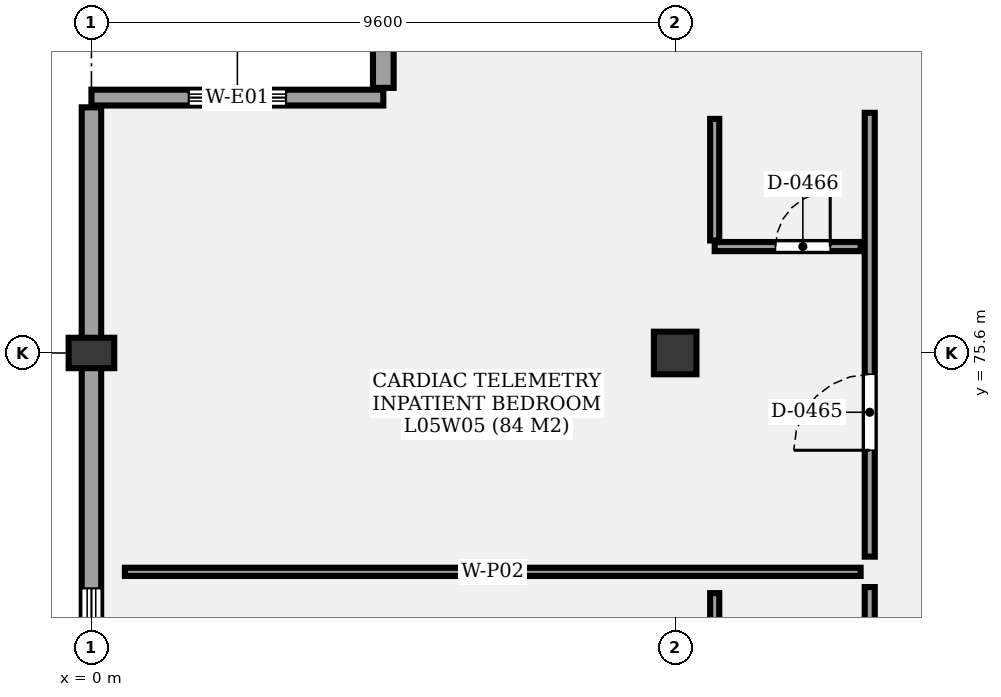
"""IFC4 building model, lengths in metres.
Left out: names, types, materials, properties, quantities, classifications, styles, units other than length and angle.
Written with IfcOpenShell. Run it as: python <this file> out.ifc"""

import sys

from ifc_helpers import new_model, si_unit, direction, frame, frame_2d, origin, origin_2d, place, context, subcontext, project, spatial, rectangle, extrude, element, fill, save


model = new_model("IFC4")
c1 = context("Model", 3, precision=1e-05, world=origin(), true_north=direction((0.0, 1.0)))
c2 = subcontext(c1, "Body", "Model", "MODEL_VIEW")
j1 = project(units=[si_unit("LENGTHUNIT", "METRE"), si_unit("PLANEANGLEUNIT", "RADIAN")], contexts=[c1])
p1 = place(None, origin())
s1 = spatial("IfcSite", under=j1, at=p1, CompositionType="ELEMENT")
p2 = place(p1, origin())
s2 = spatial("IfcBuilding", under=s1, at=p2, CompositionType="ELEMENT")
p3 = place(p2, frame((0.0, 0.0, 22.0)))
s3 = spatial("IfcBuildingStorey", under=s2, at=p3, CompositionType="ELEMENT", Elevation=22.0)
p4 = place(p3, frame((0.0, 75.6, 0.0), z_axis=(0.0, 0.0, 1.0), x_axis=(1.0, 0.0, 0.0)))
e1 = element("IfcColumn", 1, at=p4, inside=s3, PredefinedType="COLUMN", context=c2, shape_type="SweptSolid", body=[
    extrude(rectangle(XDim=0.75, YDim=0.5, at=origin_2d()), origin(), (0.0, 0.0, 1.0), 4.2),
])
p5 = place(p3, frame((9.6, 75.6, 0.0), z_axis=(0.0, 0.0, 1.0), x_axis=(1.0, 0.0, 0.0)))
e2 = element("IfcColumn", 2, at=p5, inside=s3, PredefinedType="COLUMN", context=c2, shape_type="SweptSolid", body=[
    extrude(rectangle(XDim=0.7, YDim=0.7, at=origin_2d()), origin(), (0.0, 0.0, 1.0), 4.2),
])
p6 = place(p3, frame((0.0, 79.8, 0.0), z_axis=(0.0, 0.0, 1.0), x_axis=(1.0, 0.0, 0.0)))
e3 = element("IfcWall", 3, at=p6, inside=s3, PredefinedType="SOLIDWALL", context=c2, shape_type="SweptSolid", body=[
    extrude(rectangle(XDim=4.8, YDim=0.26, at=frame_2d((2.4, 0.0))), origin(), (0.0, 0.0, 1.0), 3.39),
])
p7 = place(p6, frame((1.6, 0.0, 0.85)))
e4 = element("IfcOpeningElement", 4, at=p7, cuts=e3, PredefinedType="OPENING", context=c2, shape_type="SweptSolid", body=[
    extrude(rectangle(XDim=1.6, YDim=1.4, at=frame_2d((0.8, 0.7))), frame((0.0, 0.14, 0.0), z_axis=(0.0, -1.0, 0.0), x_axis=(1.0, 0.0, 0.0)), (0.0, 0.0, 1.0), 0.28),
])
p8 = place(p3, frame((0.0, 67.2, 0.0), z_axis=(0.0, 0.0, 1.0), x_axis=(0.0, 1.0, 0.0)))
e5 = element("IfcWall", 5, at=p8, inside=s3, PredefinedType="SOLIDWALL", context=c2, shape_type="SweptSolid", body=[
    extrude(rectangle(XDim=12.44, YDim=0.32, at=frame_2d((6.22, 0.0))), origin(), (0.0, 0.0, 1.0), 3.39),
])
p9 = place(p8, frame((2.779, 0.0, 0.85)))
e6 = element("IfcOpeningElement", 6, at=p9, cuts=e5, PredefinedType="OPENING", context=c2, shape_type="SweptSolid", body=[
    extrude(rectangle(XDim=1.75, YDim=1.4, at=frame_2d((0.875, 0.7))), frame((0.0, 0.17, 0.0), z_axis=(0.0, -1.0, 0.0), x_axis=(1.0, 0.0, 0.0)), (0.0, 0.0, 1.0), 0.34),
])
p10 = place(p3, frame((4.8, 79.96, 0.0), z_axis=(0.0, 0.0, 1.0), x_axis=(0.0, 1.0, 0.0)))
e7 = element("IfcWall", 7, at=p10, inside=s3, PredefinedType="SOLIDWALL", context=c2, shape_type="SweptSolid", body=[
    extrude(rectangle(XDim=3.88, YDim=0.34, at=frame_2d((1.94, 0.0))), origin(), (0.0, 0.0, 1.0), 3.39),
])
p11 = place(p3, frame((12.8, 64.45, 0.0), z_axis=(0.0, 0.0, 1.0), x_axis=(0.0, 1.0, 0.0)))
e8 = element("IfcWall", 8, at=p11, inside=s3, PredefinedType="PARTITIONING", context=c2, shape_type="SweptSolid", body=[
    extrude(rectangle(XDim=7.3, YDim=0.165, at=frame_2d((3.65, 0.0))), origin(), (0.0, 0.0, 1.0), 3.3),
])
p12 = place(p11, frame((2.45, 0.0, 0.0)))
e9 = element("IfcOpeningElement", 9, at=p12, cuts=e8, PredefinedType="OPENING", context=c2, shape_type="SweptSolid", body=[
    extrude(rectangle(XDim=1.3, YDim=2.2, at=frame_2d((0.65, 1.1))), frame((0.0, 0.093, 0.0), z_axis=(0.0, -1.0, 0.0), x_axis=(1.0, 0.0, 0.0)), (0.0, 0.0, 1.0), 0.185),
])
p13 = place(p3, frame((10.25, 69.65, 0.0), z_axis=(0.0, 0.0, 1.0), x_axis=(0.0, 1.0, 0.0)))
e10 = element("IfcWall", 10, at=p13, inside=s3, PredefinedType="PARTITIONING", context=c2, shape_type="SweptSolid", body=[
    extrude(rectangle(XDim=2.0, YDim=0.15, at=frame_2d((1.0, 0.0))), origin(), (0.0, 0.0, 1.0), 3.3),
])
p14 = place(p3, frame((12.8, 72.25, 0.0), z_axis=(0.0, 0.0, 1.0), x_axis=(0.0, 1.0, 0.0)))
e11 = element("IfcWall", 11, at=p14, inside=s3, PredefinedType="PARTITIONING", context=c2, shape_type="SweptSolid", body=[
    extrude(rectangle(XDim=7.3, YDim=0.165, at=frame_2d((3.65, 0.0))), origin(), (0.0, 0.0, 1.0), 3.3),
])
p15 = place(p14, frame((1.75, 0.0, 0.0)))
e12 = element("IfcOpeningElement", 12, at=p15, cuts=e11, PredefinedType="OPENING", context=c2, shape_type="SweptSolid", body=[
    extrude(rectangle(XDim=1.25, YDim=2.2, at=frame_2d((0.625, 1.1))), frame((0.0, 0.093, 0.0), z_axis=(0.0, -1.0, 0.0), x_axis=(1.0, 0.0, 0.0)), (0.0, 0.0, 1.0), 0.185),
])
p16 = place(p3, frame((10.25, 77.35, 0.0), z_axis=(0.0, 0.0, 1.0), x_axis=(1.0, 0.0, 0.0)))
e13 = element("IfcWall", 13, at=p16, inside=s3, PredefinedType="PARTITIONING", context=c2, shape_type="SweptSolid", body=[
    extrude(rectangle(XDim=2.4, YDim=0.15, at=frame_2d((1.2, 0.0))), origin(), (0.0, 0.0, 1.0), 3.3),
])
p17 = place(p16, frame((1.0, 0.0, 0.0)))
e14 = element("IfcOpeningElement", 14, at=p17, cuts=e13, PredefinedType="OPENING", context=c2, shape_type="SweptSolid", body=[
    extrude(rectangle(XDim=0.9, YDim=2.1, at=frame_2d((0.45, 1.05))), frame((0.0, 0.085, 0.0), z_axis=(0.0, -1.0, 0.0), x_axis=(1.0, 0.0, 0.0)), (0.0, 0.0, 1.0), 0.17),
])
p18 = place(p3, frame((10.25, 77.45, 0.0), z_axis=(0.0, 0.0, 1.0), x_axis=(0.0, 1.0, 0.0)))
e15 = element("IfcWall", 15, at=p18, inside=s3, PredefinedType="PARTITIONING", context=c2, shape_type="SweptSolid", body=[
    extrude(rectangle(XDim=2.0, YDim=0.15, at=frame_2d((1.0, 0.0))), origin(), (0.0, 0.0, 1.0), 3.3),
])
p19 = place(p3, frame((0.55, 72.0, 0.0), z_axis=(0.0, 0.0, 1.0), x_axis=(1.0, 0.0, 0.0)))
e16 = element("IfcWall", 16, at=p19, inside=s3, PredefinedType="PARTITIONING", context=c2, shape_type="SweptSolid", body=[
    extrude(rectangle(XDim=12.1, YDim=0.135, at=frame_2d((6.05, 0.0))), origin(), (0.0, 0.0, 1.0), 3.3),
])
p20 = place(p7, origin())
e17 = element("IfcWindow", 17, at=p20, inside=s3, PartitioningType="SINGLE_PANEL", PredefinedType="WINDOW", context=c2, shape_type="SweptSolid", body=[
    extrude(rectangle(XDim=1.6, YDim=1.4, at=frame_2d((0.8, 0.7))), frame((0.0, 0.03, 0.0), z_axis=(0.0, -1.0, 0.0), x_axis=(1.0, 0.0, 0.0)), (0.0, 0.0, 1.0), 0.06),
])
fill(e4, e17)
p21 = place(p9, origin())
e18 = element("IfcWindow", 18, at=p21, inside=s3, PartitioningType="SINGLE_PANEL", PredefinedType="WINDOW", context=c2, shape_type="SweptSolid", body=[
    extrude(rectangle(XDim=1.75, YDim=1.4, at=frame_2d((0.875, 0.7))), frame((0.0, 0.03, 0.0), z_axis=(0.0, -1.0, 0.0), x_axis=(1.0, 0.0, 0.0)), (0.0, 0.0, 1.0), 0.06),
])
fill(e6, e18)
p22 = place(p15, origin())
e19 = element("IfcDoor", 19, at=p22, inside=s3, OperationType="SINGLE_SWING_LEFT", PredefinedType="DOOR", context=c2, shape_type="SweptSolid", body=[
    extrude(rectangle(XDim=1.25, YDim=2.2, at=frame_2d((0.625, 1.1))), frame((0.0, 0.025, 0.0), z_axis=(0.0, -1.0, 0.0), x_axis=(1.0, 0.0, 0.0)), (0.0, 0.0, 1.0), 0.05),
])
fill(e12, e19)
p23 = place(p17, origin())
e20 = element("IfcDoor", 20, at=p23, inside=s3, OperationType="SINGLE_SWING_RIGHT", PredefinedType="DOOR", context=c2, shape_type="SweptSolid", body=[
    extrude(rectangle(XDim=0.9, YDim=2.1, at=frame_2d((0.45, 1.05))), frame((0.0, 0.025, 0.0), z_axis=(0.0, -1.0, 0.0), x_axis=(1.0, 0.0, 0.0)), (0.0, 0.0, 1.0), 0.05),
])
fill(e14, e20)
save(model, sys.argv[1])
